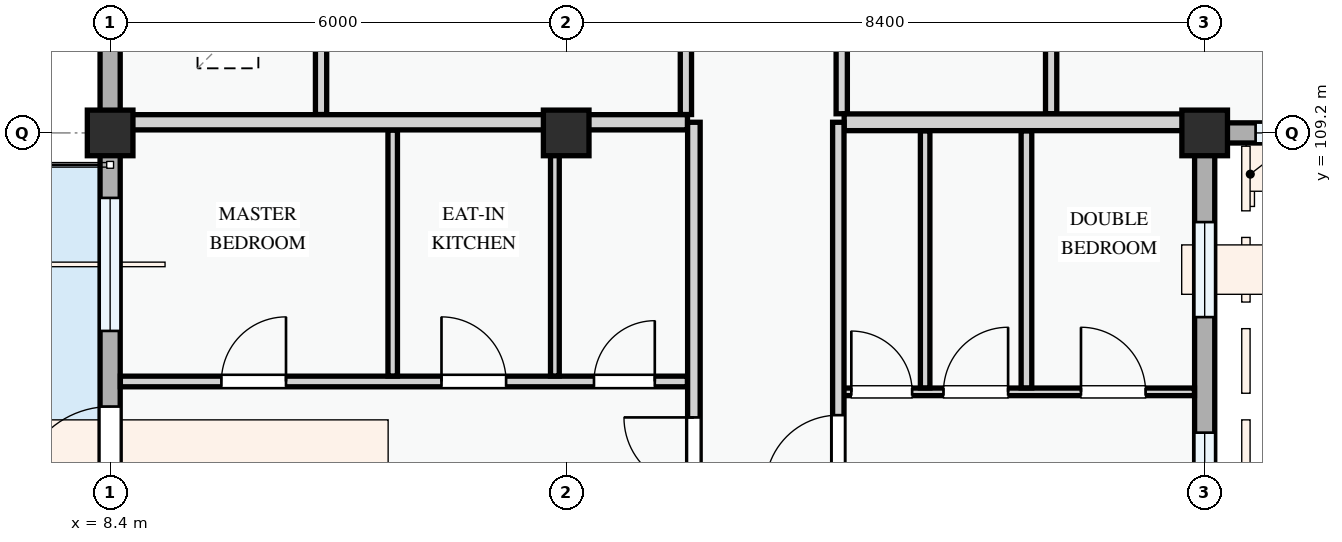
"""IFC4 building model, lengths in metres.
Left out: names, types, materials, properties, quantities, classifications, styles, units other than length and angle.
Written with IfcOpenShell. Run it as: python <this file> out.ifc"""

import sys

from ifc_helpers import new_model, si_unit, direction, frame, frame_2d, origin, origin_2d, place, context, subcontext, project, spatial, rectangle, extrude, element, fill, save


model = new_model("IFC4")
c1 = context("Model", 3, precision=1e-05, world=origin(), true_north=direction((0.0, 1.0)))
c2 = subcontext(c1, "Body", "Model", "MODEL_VIEW")
j1 = project(units=[si_unit("LENGTHUNIT", "METRE"), si_unit("PLANEANGLEUNIT", "RADIAN")], contexts=[c1])
p1 = place(None, origin())
s1 = spatial("IfcSite", under=j1, at=p1, CompositionType="ELEMENT")
p2 = place(p1, origin())
s2 = spatial("IfcBuilding", under=s1, at=p2, CompositionType="ELEMENT")
p3 = place(p2, frame((0.0, 0.0, 34.5)))
s3 = spatial("IfcBuildingStorey", under=s2, at=p3, CompositionType="ELEMENT", Elevation=34.5)
for number, where, z_axis, x_axis in (
    (1, (8.4, 109.2, 0.0), (0.0, 0.0, 1.0), (1.0, 0.0, 0.0)),
    (2, (14.4, 109.2, 0.0), (0.0, 0.0, 1.0), (1.0, 0.0, 0.0)),
    (3, (22.8, 109.2, 0.0), (0.0, 0.0, 1.0), (1.0, 0.0, 0.0)),
):
    element("IfcColumn", number, at=place(p3, frame(where, z_axis=z_axis, x_axis=x_axis)), inside=s3, PredefinedType="COLUMN", context=c2, shape_type="SweptSolid", body=[
        extrude(rectangle(XDim=0.6, YDim=0.6, at=origin_2d()), origin(), (0.0, 0.0, 1.0), 3.3),
    ])
p4 = place(p3, frame((22.8, 109.2, 0.0), z_axis=(0.0, 0.0, 1.0), x_axis=(1.0, 0.0, 0.0)))
e4 = element("IfcWall", 4, at=p4, inside=s3, PredefinedType="STANDARD", context=c2, shape_type="SweptSolid", body=[
    extrude(rectangle(XDim=6.0, YDim=0.265, at=frame_2d((3.0, 0.0))), origin(), (0.0, 0.0, 1.0), 2.525),
])
p5 = place(p4, frame((0.67, 0.0, 0.78)))
e5 = element("IfcOpeningElement", 5, at=p5, cuts=e4, PredefinedType="OPENING", context=c2, shape_type="SweptSolid", body=[
    extrude(rectangle(XDim=1.2, YDim=1.5, at=frame_2d((0.6, 0.75))), frame((0.0, 0.143, 0.0), z_axis=(0.0, -1.0, 0.0), x_axis=(1.0, 0.0, 0.0)), (0.0, 0.0, 1.0), 0.285),
])
p6 = place(p4, frame((3.22, 0.0, 0.78)))
e6 = element("IfcOpeningElement", 6, at=p6, cuts=e4, PredefinedType="OPENING", context=c2, shape_type="SweptSolid", body=[
    extrude(rectangle(XDim=1.72, YDim=1.52, at=frame_2d((0.86, 0.76))), frame((0.0, 0.143, 0.0), z_axis=(0.0, -1.0, 0.0), x_axis=(1.0, 0.0, 0.0)), (0.0, 0.0, 1.0), 0.285),
])
p7 = place(p3, frame((8.4, 115.2, 0.0), z_axis=(0.0, 0.0, 1.0), x_axis=(0.0, -1.0, 0.0)))
e7 = element("IfcWall", 7, at=p7, inside=s3, PredefinedType="STANDARD", context=c2, shape_type="SweptSolid", body=[
    extrude(rectangle(XDim=6.0, YDim=0.265, at=frame_2d((3.0, 0.0))), origin(), (0.0, 0.0, 1.0), 2.445),
])
p8 = place(p7, frame((0.52, 0.0, 0.78)))
e8 = element("IfcOpeningElement", 8, at=p8, cuts=e7, PredefinedType="OPENING", context=c2, shape_type="SweptSolid", body=[
    extrude(rectangle(XDim=0.95, YDim=1.15, at=frame_2d((0.475, 0.575))), frame((0.0, 0.143, 0.0), z_axis=(0.0, -1.0, 0.0), x_axis=(1.0, 0.0, 0.0)), (0.0, 0.0, 1.0), 0.285),
])
p9 = place(p7, frame((3.115, 0.0, 0.78)))
e9 = element("IfcOpeningElement", 9, at=p9, cuts=e7, PredefinedType="OPENING", context=c2, shape_type="SweptSolid", body=[
    extrude(rectangle(XDim=1.38, YDim=1.48, at=frame_2d((0.69, 0.74))), frame((0.0, 0.143, 0.0), z_axis=(0.0, -1.0, 0.0), x_axis=(1.0, 0.0, 0.0)), (0.0, 0.0, 1.0), 0.285),
])
p10 = place(p3, frame((8.4, 109.2, 0.0), z_axis=(0.0, 0.0, 1.0), x_axis=(0.0, -1.0, 0.0)))
e10 = element("IfcWall", 10, at=p10, inside=s3, PredefinedType="STANDARD", context=c2, shape_type="SweptSolid", body=[
    extrude(rectangle(XDim=8.4, YDim=0.265, at=frame_2d((4.2, 0.0))), origin(), (0.0, 0.0, 1.0), 2.345),
])
p11 = place(p10, frame((3.6, 0.0, 0.0)))
e11 = element("IfcOpeningElement", 11, at=p11, cuts=e10, PredefinedType="OPENING", context=c2, shape_type="SweptSolid", body=[
    extrude(rectangle(XDim=1.2, YDim=2.15, at=frame_2d((0.6, 1.075))), frame((0.0, 0.143, 0.0), z_axis=(0.0, -1.0, 0.0), x_axis=(1.0, 0.0, 0.0)), (0.0, 0.0, 1.0), 0.285),
])
p12 = place(p10, frame((0.855, 0.0, 0.78)))
e12 = element("IfcOpeningElement", 12, at=p12, cuts=e10, PredefinedType="OPENING", context=c2, shape_type="SweptSolid", body=[
    extrude(rectangle(XDim=1.75, YDim=1.45, at=frame_2d((0.875, 0.725))), frame((0.0, 0.143, 0.0), z_axis=(0.0, -1.0, 0.0), x_axis=(1.0, 0.0, 0.0)), (0.0, 0.0, 1.0), 0.285),
])
p13 = place(p10, frame((5.14, 0.0, 0.78)))
e13 = element("IfcOpeningElement", 13, at=p13, cuts=e10, PredefinedType="OPENING", context=c2, shape_type="SweptSolid", body=[
    extrude(rectangle(XDim=1.25, YDim=1.45, at=frame_2d((0.625, 0.725))), frame((0.0, 0.143, 0.0), z_axis=(0.0, -1.0, 0.0), x_axis=(1.0, 0.0, 0.0)), (0.0, 0.0, 1.0), 0.285),
])
p14 = place(p10, frame((6.995, 0.0, 0.78)))
e14 = element("IfcOpeningElement", 14, at=p14, cuts=e10, PredefinedType="OPENING", context=c2, shape_type="SweptSolid", body=[
    extrude(rectangle(XDim=0.9, YDim=1.2, at=frame_2d((0.45, 0.6))), frame((0.0, 0.143, 0.0), z_axis=(0.0, -1.0, 0.0), x_axis=(1.0, 0.0, 0.0)), (0.0, 0.0, 1.0), 0.285),
])
p15 = place(p3, frame((22.8, 100.8, 0.0), z_axis=(0.0, 0.0, 1.0), x_axis=(0.0, 1.0, 0.0)))
e15 = element("IfcWall", 15, at=p15, inside=s3, PredefinedType="STANDARD", context=c2, shape_type="SweptSolid", body=[
    extrude(rectangle(XDim=8.4, YDim=0.265, at=frame_2d((4.2, 0.0))), origin(), (0.0, 0.0, 1.0), 2.425),
])
p16 = place(p15, frame((0.505, 0.0, 0.78)))
e16 = element("IfcOpeningElement", 16, at=p16, cuts=e15, PredefinedType="OPENING", context=c2, shape_type="SweptSolid", body=[
    extrude(rectangle(XDim=0.9, YDim=1.2, at=frame_2d((0.45, 0.6))), frame((0.0, 0.143, 0.0), z_axis=(0.0, -1.0, 0.0), x_axis=(1.0, 0.0, 0.0)), (0.0, 0.0, 1.0), 0.285),
])
p17 = place(p15, frame((2.257, 0.0, 0.78)))
e17 = element("IfcOpeningElement", 17, at=p17, cuts=e15, PredefinedType="OPENING", context=c2, shape_type="SweptSolid", body=[
    extrude(rectangle(XDim=2.2, YDim=1.5, at=frame_2d((1.1, 0.75))), frame((0.0, 0.143, 0.0), z_axis=(0.0, -1.0, 0.0), x_axis=(1.0, 0.0, 0.0)), (0.0, 0.0, 1.0), 0.285),
])
p18 = place(p15, frame((5.977, 0.0, 0.78)))
e18 = element("IfcOpeningElement", 18, at=p18, cuts=e15, PredefinedType="OPENING", context=c2, shape_type="SweptSolid", body=[
    extrude(rectangle(XDim=1.25, YDim=1.45, at=frame_2d((0.625, 0.725))), frame((0.0, 0.143, 0.0), z_axis=(0.0, -1.0, 0.0), x_axis=(1.0, 0.0, 0.0)), (0.0, 0.0, 1.0), 0.285),
])
for number, where, z_axis, x_axis in (
    (19, (11.175, 113.324, 0.0), (0.0, 0.0, 1.0), (0.0, -1.0, 0.0)),
    (20, (15.975, 113.324, 0.0), (0.0, 0.0, 1.0), (0.0, -1.0, 0.0)),
):
    element("IfcWall", number, at=place(p3, frame(where, z_axis=z_axis, x_axis=x_axis)), inside=s3, PredefinedType="PARTITIONING", context=c2, shape_type="SweptSolid", body=[
        extrude(rectangle(XDim=3.882, YDim=0.148, at=frame_2d((1.941, 0.0))), origin(), (0.0, 0.0, 1.0), 3.0),
    ])
for number, where, z_axis, x_axis in (
    (21, (18.025, 113.324, 0.0), (0.0, 0.0, 1.0), (0.0, -1.0, 0.0)),
    (22, (20.78, 113.324, 0.0), (0.0, 0.0, 1.0), (0.0, -1.0, 0.0)),
):
    element("IfcWall", number, at=place(p3, frame(where, z_axis=z_axis, x_axis=x_axis)), inside=s3, PredefinedType="PARTITIONING", context=c2, shape_type="SweptSolid", body=[
        extrude(rectangle(XDim=3.872, YDim=0.148, at=frame_2d((1.936, 0.0))), origin(), (0.0, 0.0, 1.0), 3.0),
    ])
p19 = place(p3, frame((8.534, 105.93, 0.0), z_axis=(0.0, 0.0, 1.0), x_axis=(1.0, 0.0, 0.0)))
e23 = element("IfcWall", 23, at=p19, inside=s3, PredefinedType="PARTITIONING", context=c2, shape_type="SweptSolid", body=[
    extrude(rectangle(XDim=7.461, YDim=0.14, at=frame_2d((3.73, 0.0))), origin(), (0.0, 0.0, 1.0), 3.0),
])
p20 = place(p19, frame((1.329, 0.0, 0.0)))
e24 = element("IfcOpeningElement", 24, at=p20, cuts=e23, PredefinedType="OPENING", context=c2, shape_type="SweptSolid", body=[
    extrude(rectangle(XDim=0.85, YDim=2.1, at=frame_2d((0.425, 1.05))), frame((0.0, 0.08, 0.0), z_axis=(0.0, -1.0, 0.0), x_axis=(1.0, 0.0, 0.0)), (0.0, 0.0, 1.0), 0.16),
])
p21 = place(p19, frame((4.225, 0.0, 0.0)))
e25 = element("IfcOpeningElement", 25, at=p21, cuts=e23, PredefinedType="OPENING", context=c2, shape_type="SweptSolid", body=[
    extrude(rectangle(XDim=0.85, YDim=2.1, at=frame_2d((0.425, 1.05))), frame((0.0, 0.08, 0.0), z_axis=(0.0, -1.0, 0.0), x_axis=(1.0, 0.0, 0.0)), (0.0, 0.0, 1.0), 0.16),
])
p22 = place(p19, frame((6.231, 0.0, 0.0)))
e26 = element("IfcOpeningElement", 26, at=p22, cuts=e23, PredefinedType="OPENING", context=c2, shape_type="SweptSolid", body=[
    extrude(rectangle(XDim=0.8, YDim=2.1, at=frame_2d((0.4, 1.05))), frame((0.0, 0.08, 0.0), z_axis=(0.0, -1.0, 0.0), x_axis=(1.0, 0.0, 0.0)), (0.0, 0.0, 1.0), 0.16),
])
p23 = place(p3, frame((12.118, 106.002, 0.0), z_axis=(0.0, 0.0, 1.0), x_axis=(0.0, 1.0, 0.0)))
e27 = element("IfcWall", 27, at=p23, inside=s3, PredefinedType="PARTITIONING", context=c2, shape_type="SweptSolid", body=[
    extrude(rectangle(XDim=3.236, YDim=0.125, at=frame_2d((1.618, 0.0))), origin(), (0.0, 0.0, 1.0), 3.0),
])
p24 = place(p3, frame((14.251, 106.002, 0.0), z_axis=(0.0, 0.0, 1.0), x_axis=(0.0, 1.0, 0.0)))
e28 = element("IfcWall", 28, at=p24, inside=s3, PredefinedType="PARTITIONING", context=c2, shape_type="SweptSolid", body=[
    extrude(rectangle(XDim=3.236, YDim=0.115, at=frame_2d((1.618, 0.0))), origin(), (0.0, 0.0, 1.0), 2.425),
])
p25 = place(p3, frame((17.98, 105.794, 0.0), z_axis=(0.0, 0.0, 1.0), x_axis=(1.0, 0.0, 0.0)))
e29 = element("IfcWall", 29, at=p25, inside=s3, PredefinedType="PARTITIONING", context=c2, shape_type="SweptSolid", body=[
    extrude(rectangle(XDim=4.686, YDim=0.1, at=frame_2d((2.343, 0.0))), origin(), (0.0, 0.0, 1.0), 3.0),
])
p26 = place(p25, frame((0.171, 0.0, 0.0)))
e30 = element("IfcOpeningElement", 30, at=p26, cuts=e29, PredefinedType="OPENING", context=c2, shape_type="SweptSolid", body=[
    extrude(rectangle(XDim=0.8, YDim=2.1, at=frame_2d((0.4, 1.05))), frame((0.0, 0.06, 0.0), z_axis=(0.0, -1.0, 0.0), x_axis=(1.0, 0.0, 0.0)), (0.0, 0.0, 1.0), 0.12),
])
p27 = place(p25, frame((1.384, 0.0, 0.0)))
e31 = element("IfcOpeningElement", 31, at=p27, cuts=e29, PredefinedType="OPENING", context=c2, shape_type="SweptSolid", body=[
    extrude(rectangle(XDim=0.85, YDim=2.1, at=frame_2d((0.425, 1.05))), frame((0.0, 0.06, 0.0), z_axis=(0.0, -1.0, 0.0), x_axis=(1.0, 0.0, 0.0)), (0.0, 0.0, 1.0), 0.12),
])
p28 = place(p25, frame((3.193, 0.0, 0.0)))
e32 = element("IfcOpeningElement", 32, at=p28, cuts=e29, PredefinedType="OPENING", context=c2, shape_type="SweptSolid", body=[
    extrude(rectangle(XDim=0.85, YDim=2.1, at=frame_2d((0.425, 1.05))), frame((0.0, 0.06, 0.0), z_axis=(0.0, -1.0, 0.0), x_axis=(1.0, 0.0, 0.0)), (0.0, 0.0, 1.0), 0.12),
])
p29 = place(p3, frame((20.455, 105.846, 0.0), z_axis=(0.0, 0.0, 1.0), x_axis=(0.0, 1.0, 0.0)))
e33 = element("IfcWall", 33, at=p29, inside=s3, PredefinedType="PARTITIONING", context=c2, shape_type="SweptSolid", body=[
    extrude(rectangle(XDim=3.382, YDim=0.14, at=frame_2d((1.691, 0.0))), origin(), (0.0, 0.0, 1.0), 3.0),
])
p30 = place(p3, frame((19.122, 105.846, 0.0), z_axis=(0.0, 0.0, 1.0), x_axis=(0.0, 1.0, 0.0)))
e34 = element("IfcWall", 34, at=p30, inside=s3, PredefinedType="PARTITIONING", context=c2, shape_type="SweptSolid", body=[
    extrude(rectangle(XDim=3.382, YDim=0.125, at=frame_2d((1.691, 0.0))), origin(), (0.0, 0.0, 1.0), 3.0),
])
p31 = place(p3, frame((8.534, 109.34, 0.0), z_axis=(0.0, 0.0, 1.0), x_axis=(1.0, 0.0, 0.0)))
e35 = element("IfcWall", 35, at=p31, inside=s3, PredefinedType="PARTITIONING", context=c2, shape_type="SweptSolid", body=[
    extrude(rectangle(XDim=7.461, YDim=0.2, at=frame_2d((3.73, 0.0))), origin(), (0.0, 0.0, 1.0), 2.375),
])
p32 = place(p3, frame((18.057, 109.34, 0.0), z_axis=(0.0, 0.0, 1.0), x_axis=(1.0, 0.0, 0.0)))
e36 = element("IfcWall", 36, at=p32, inside=s3, PredefinedType="PARTITIONING", context=c2, shape_type="SweptSolid", body=[
    extrude(rectangle(XDim=4.683, YDim=0.22, at=frame_2d((2.342, 0.0))), origin(), (0.0, 0.0, 1.0), 2.375),
])
p33 = place(p3, frame((16.08, 86.534, 0.0), z_axis=(0.0, 0.0, 1.0), x_axis=(0.0, 1.0, 0.0)))
e37 = element("IfcWall", 37, at=p33, inside=s3, PredefinedType="PARTITIONING", context=c2, shape_type="SweptSolid", body=[
    extrude(rectangle(XDim=22.806, YDim=0.165, at=frame_2d((11.403, 0.0))), origin(), (0.0, 0.0, 1.0), 3.0),
])
p34 = place(p33, frame((2.006, 0.0, 0.0)))
e38 = element("IfcOpeningElement", 38, at=p34, cuts=e37, PredefinedType="OPENING", context=c2, shape_type="SweptSolid", body=[
    extrude(rectangle(XDim=0.96, YDim=2.12, at=frame_2d((0.48, 1.06))), frame((0.0, 0.093, 0.0), z_axis=(0.0, -1.0, 0.0), x_axis=(1.0, 0.0, 0.0)), (0.0, 0.0, 1.0), 0.185),
])
p35 = place(p33, frame((10.035, 0.0, 0.0)))
e39 = element("IfcOpeningElement", 39, at=p35, cuts=e37, PredefinedType="OPENING", context=c2, shape_type="SweptSolid", body=[
    extrude(rectangle(XDim=0.92, YDim=2.1, at=frame_2d((0.46, 1.05))), frame((0.0, 0.093, 0.0), z_axis=(0.0, -1.0, 0.0), x_axis=(1.0, 0.0, 0.0)), (0.0, 0.0, 1.0), 0.185),
])
p36 = place(p33, frame((18.003, 0.0, 0.0)))
e40 = element("IfcOpeningElement", 40, at=p36, cuts=e37, PredefinedType="OPENING", context=c2, shape_type="SweptSolid", body=[
    extrude(rectangle(XDim=0.92, YDim=2.1, at=frame_2d((0.46, 1.05))), frame((0.0, 0.093, 0.0), z_axis=(0.0, -1.0, 0.0), x_axis=(1.0, 0.0, 0.0)), (0.0, 0.0, 1.0), 0.185),
])
p37 = place(p3, frame((17.98, 86.534, 0.0), z_axis=(0.0, 0.0, 1.0), x_axis=(0.0, 1.0, 0.0)))
e41 = element("IfcWall", 41, at=p37, inside=s3, PredefinedType="PARTITIONING", context=c2, shape_type="SweptSolid", body=[
    extrude(rectangle(XDim=22.806, YDim=0.15, at=frame_2d((11.403, 0.0))), origin(), (0.0, 0.0, 1.0), 3.0),
])
p38 = place(p37, frame((1.874, 0.0, 0.0)))
e42 = element("IfcOpeningElement", 42, at=p38, cuts=e41, PredefinedType="OPENING", context=c2, shape_type="SweptSolid", body=[
    extrude(rectangle(XDim=0.92, YDim=2.1, at=frame_2d((0.46, 1.05))), frame((0.0, 0.085, 0.0), z_axis=(0.0, -1.0, 0.0), x_axis=(1.0, 0.0, 0.0)), (0.0, 0.0, 1.0), 0.17),
])
p39 = place(p37, frame((9.846, 0.0, 0.0)))
e43 = element("IfcOpeningElement", 43, at=p39, cuts=e41, PredefinedType="OPENING", context=c2, shape_type="SweptSolid", body=[
    extrude(rectangle(XDim=0.92, YDim=2.1, at=frame_2d((0.46, 1.05))), frame((0.0, 0.085, 0.0), z_axis=(0.0, -1.0, 0.0), x_axis=(1.0, 0.0, 0.0)), (0.0, 0.0, 1.0), 0.17),
])
p40 = place(p37, frame((17.992, 0.0, 0.0)))
e44 = element("IfcOpeningElement", 44, at=p40, cuts=e41, PredefinedType="OPENING", context=c2, shape_type="SweptSolid", body=[
    extrude(rectangle(XDim=0.96, YDim=2.12, at=frame_2d((0.48, 1.06))), frame((0.0, 0.085, 0.0), z_axis=(0.0, -1.0, 0.0), x_axis=(1.0, 0.0, 0.0)), (0.0, 0.0, 1.0), 0.17),
])
p41 = place(p5, origin())
e45 = element("IfcWindow", 45, at=p41, inside=s3, PartitioningType="SINGLE_PANEL", PredefinedType="WINDOW", context=c2, shape_type="SweptSolid", body=[
    extrude(rectangle(XDim=1.2, YDim=1.5, at=frame_2d((0.6, 0.75))), frame((0.0, 0.03, 0.0), z_axis=(0.0, -1.0, 0.0), x_axis=(1.0, 0.0, 0.0)), (0.0, 0.0, 1.0), 0.06),
])
fill(e5, e45)
p42 = place(p11, frame((1.2, 0.0, 0.0), z_axis=(0.0, 0.0, 1.0), x_axis=(-1.0, 0.0, 0.0)))
e46 = element("IfcDoor", 46, at=p42, inside=s3, OperationType="SINGLE_SWING_LEFT", PredefinedType="DOOR", context=c2, shape_type="SweptSolid", body=[
    extrude(rectangle(XDim=1.2, YDim=2.15, at=frame_2d((0.6, 1.075))), frame((0.0, 0.025, 0.0), z_axis=(0.0, -1.0, 0.0), x_axis=(1.0, 0.0, 0.0)), (0.0, 0.0, 1.0), 0.05),
])
fill(e11, e46)
p43 = place(p12, origin())
e47 = element("IfcWindow", 47, at=p43, inside=s3, PartitioningType="DOUBLE_PANEL_VERTICAL", PredefinedType="WINDOW", context=c2, shape_type="SweptSolid", body=[
    extrude(rectangle(XDim=1.75, YDim=1.45, at=frame_2d((0.875, 0.725))), frame((0.0, 0.03, 0.0), z_axis=(0.0, -1.0, 0.0), x_axis=(1.0, 0.0, 0.0)), (0.0, 0.0, 1.0), 0.06),
])
fill(e12, e47)
p44 = place(p17, origin())
e48 = element("IfcWindow", 48, at=p44, inside=s3, PartitioningType="DOUBLE_PANEL_VERTICAL", PredefinedType="WINDOW", context=c2, shape_type="SweptSolid", body=[
    extrude(rectangle(XDim=2.2, YDim=1.5, at=frame_2d((1.1, 0.75))), frame((0.0, 0.03, 0.0), z_axis=(0.0, -1.0, 0.0), x_axis=(1.0, 0.0, 0.0)), (0.0, 0.0, 1.0), 0.06),
])
fill(e17, e48)
p45 = place(p18, origin())
e49 = element("IfcWindow", 49, at=p45, inside=s3, PartitioningType="SINGLE_PANEL", PredefinedType="WINDOW", context=c2, shape_type="SweptSolid", body=[
    extrude(rectangle(XDim=1.25, YDim=1.45, at=frame_2d((0.625, 0.725))), frame((0.0, 0.03, 0.0), z_axis=(0.0, -1.0, 0.0), x_axis=(1.0, 0.0, 0.0)), (0.0, 0.0, 1.0), 0.06),
])
fill(e18, e49)
p46 = place(p20, origin())
e50 = element("IfcDoor", 50, at=p46, inside=s3, OperationType="SINGLE_SWING_RIGHT", PredefinedType="DOOR", context=c2, shape_type="SweptSolid", body=[
    extrude(rectangle(XDim=0.85, YDim=2.1, at=frame_2d((0.425, 1.05))), frame((0.0, 0.025, 0.0), z_axis=(0.0, -1.0, 0.0), x_axis=(1.0, 0.0, 0.0)), (0.0, 0.0, 1.0), 0.05),
])
fill(e24, e50)
p47 = place(p21, origin())
e51 = element("IfcDoor", 51, at=p47, inside=s3, OperationType="SINGLE_SWING_LEFT", PredefinedType="DOOR", context=c2, shape_type="SweptSolid", body=[
    extrude(rectangle(XDim=0.85, YDim=2.1, at=frame_2d((0.425, 1.05))), frame((0.0, 0.025, 0.0), z_axis=(0.0, -1.0, 0.0), x_axis=(1.0, 0.0, 0.0)), (0.0, 0.0, 1.0), 0.05),
])
fill(e25, e51)
p48 = place(p22, origin())
e52 = element("IfcDoor", 52, at=p48, inside=s3, OperationType="SINGLE_SWING_RIGHT", PredefinedType="DOOR", context=c2, shape_type="SweptSolid", body=[
    extrude(rectangle(XDim=0.8, YDim=2.1, at=frame_2d((0.4, 1.05))), frame((0.0, 0.025, 0.0), z_axis=(0.0, -1.0, 0.0), x_axis=(1.0, 0.0, 0.0)), (0.0, 0.0, 1.0), 0.05),
])
fill(e26, e52)
p49 = place(p26, origin())
e53 = element("IfcDoor", 53, at=p49, inside=s3, OperationType="SINGLE_SWING_LEFT", PredefinedType="DOOR", context=c2, shape_type="SweptSolid", body=[
    extrude(rectangle(XDim=0.8, YDim=2.1, at=frame_2d((0.4, 1.05))), frame((0.0, 0.025, 0.0), z_axis=(0.0, -1.0, 0.0), x_axis=(1.0, 0.0, 0.0)), (0.0, 0.0, 1.0), 0.05),
])
fill(e30, e53)
p50 = place(p27, origin())
e54 = element("IfcDoor", 54, at=p50, inside=s3, OperationType="SINGLE_SWING_RIGHT", PredefinedType="DOOR", context=c2, shape_type="SweptSolid", body=[
    extrude(rectangle(XDim=0.85, YDim=2.1, at=frame_2d((0.425, 1.05))), frame((0.0, 0.025, 0.0), z_axis=(0.0, -1.0, 0.0), x_axis=(1.0, 0.0, 0.0)), (0.0, 0.0, 1.0), 0.05),
])
fill(e31, e54)
p51 = place(p28, origin())
e55 = element("IfcDoor", 55, at=p51, inside=s3, OperationType="SINGLE_SWING_LEFT", PredefinedType="DOOR", context=c2, shape_type="SweptSolid", body=[
    extrude(rectangle(XDim=0.85, YDim=2.1, at=frame_2d((0.425, 1.05))), frame((0.0, 0.025, 0.0), z_axis=(0.0, -1.0, 0.0), x_axis=(1.0, 0.0, 0.0)), (0.0, 0.0, 1.0), 0.05),
])
fill(e32, e55)
p52 = place(p36, origin())
e56 = element("IfcDoor", 56, at=p52, inside=s3, OperationType="SINGLE_SWING_RIGHT", PredefinedType="DOOR", context=c2, shape_type="SweptSolid", body=[
    extrude(rectangle(XDim=0.92, YDim=2.1, at=frame_2d((0.46, 1.05))), frame((0.0, 0.025, 0.0), z_axis=(0.0, -1.0, 0.0), x_axis=(1.0, 0.0, 0.0)), (0.0, 0.0, 1.0), 0.05),
])
fill(e40, e56)
p53 = place(p40, origin())
e57 = element("IfcDoor", 57, at=p53, inside=s3, OperationType="SINGLE_SWING_LEFT", PredefinedType="DOOR", context=c2, shape_type="SweptSolid", body=[
    extrude(rectangle(XDim=0.96, YDim=2.12, at=frame_2d((0.48, 1.06))), frame((0.0, 0.025, 0.0), z_axis=(0.0, -1.0, 0.0), x_axis=(1.0, 0.0, 0.0)), (0.0, 0.0, 1.0), 0.05),
])
fill(e44, e57)
save(model, sys.argv[1])
